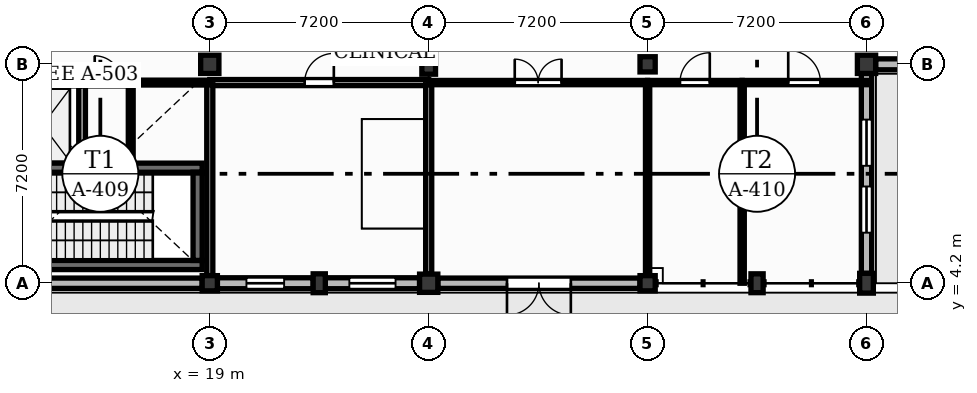
"""IFC4 building model, lengths in metres.
Left out: names, types, materials, properties, quantities, classifications, styles, units other than length and angle.
Written with IfcOpenShell. Run it as: python <this file> out.ifc"""

import sys

from ifc_helpers import new_model, si_unit, direction, frame, frame_2d, origin, origin_2d, place, context, subcontext, project, spatial, rectangle, extrude, element, fill, save


model = new_model("IFC4")
c1 = context("Model", 3, precision=1e-05, world=origin(), true_north=direction((0.0, 1.0)))
c2 = subcontext(c1, "Body", "Model", "MODEL_VIEW")
j1 = project(units=[si_unit("LENGTHUNIT", "METRE"), si_unit("PLANEANGLEUNIT", "RADIAN")], contexts=[c1])
p1 = place(None, origin())
s1 = spatial("IfcSite", under=j1, at=p1, CompositionType="ELEMENT")
p2 = place(p1, origin())
s2 = spatial("IfcBuilding", under=s1, at=p2, CompositionType="ELEMENT")
p3 = place(p2, origin())
s3 = spatial("IfcBuildingStorey", under=s2, at=p3, CompositionType="ELEMENT", Elevation=0.0)
p4 = place(p3, frame((19.0, 4.2, 0.0), z_axis=(0.0, 0.0, 1.0), x_axis=(1.0, 0.0, 0.0)))
e1 = element("IfcColumn", 1, at=p4, inside=s3, PredefinedType="COLUMN", context=c2, shape_type="SweptSolid", body=[
    extrude(rectangle(XDim=0.5, YDim=0.5, at=origin_2d()), origin(), (0.0, 0.0, 1.0), 4.2),
])
for number, where, z_axis, x_axis in (
    (2, (19.0, 11.4, 0.0), (0.0, 0.0, 1.0), (1.0, 0.0, 0.0)),
    (3, (26.2, 4.2, 0.0), (0.0, 0.0, 1.0), (1.0, 0.0, 0.0)),
):
    element("IfcColumn", number, at=place(p3, frame(where, z_axis=z_axis, x_axis=x_axis)), inside=s3, PredefinedType="COLUMN", context=c2, shape_type="SweptSolid", body=[
        extrude(rectangle(XDim=0.6, YDim=0.6, at=origin_2d()), origin(), (0.0, 0.0, 1.0), 4.2),
    ])
p5 = place(p3, frame((26.2, 11.4, 0.0), z_axis=(0.0, 0.0, 1.0), x_axis=(1.0, 0.0, 0.0)))
e4 = element("IfcColumn", 4, at=p5, inside=s3, PredefinedType="COLUMN", context=c2, shape_type="SweptSolid", body=[
    extrude(rectangle(XDim=0.45, YDim=0.65, at=origin_2d()), origin(), (0.0, 0.0, 1.0), 4.2),
])
for number, where, z_axis, x_axis in (
    (5, (33.4, 4.2, 0.0), (0.0, 0.0, 1.0), (1.0, 0.0, 0.0)),
    (6, (33.4, 11.4, 0.0), (0.0, 0.0, 1.0), (1.0, 0.0, 0.0)),
):
    element("IfcColumn", number, at=place(p3, frame(where, z_axis=z_axis, x_axis=x_axis)), inside=s3, PredefinedType="COLUMN", context=c2, shape_type="SweptSolid", body=[
        extrude(rectangle(XDim=0.5, YDim=0.5, at=origin_2d()), origin(), (0.0, 0.0, 1.0), 4.2),
    ])
p6 = place(p3, frame((40.6, 4.2, 0.0), z_axis=(0.0, 0.0, 1.0), x_axis=(1.0, 0.0, 0.0)))
e7 = element("IfcColumn", 7, at=p6, inside=s3, PredefinedType="COLUMN", context=c2, shape_type="SweptSolid", body=[
    extrude(rectangle(XDim=0.45, YDim=0.65, at=origin_2d()), origin(), (0.0, 0.0, 1.0), 4.2),
])
p7 = place(p3, frame((40.6, 11.4, 0.0), z_axis=(0.0, 0.0, 1.0), x_axis=(1.0, 0.0, 0.0)))
e8 = element("IfcColumn", 8, at=p7, inside=s3, PredefinedType="COLUMN", context=c2, shape_type="SweptSolid", body=[
    extrude(rectangle(XDim=0.6, YDim=0.6, at=origin_2d()), origin(), (0.0, 0.0, 1.0), 4.2),
])
for number, where, z_axis, x_axis in (
    (9, (22.6, 4.2, 0.0), (0.0, 0.0, 1.0), (1.0, 0.0, 0.0)),
    (10, (37.0, 4.2, 0.0), (0.0, 0.0, 1.0), (1.0, 0.0, 0.0)),
):
    element("IfcColumn", number, at=place(p3, frame(where, z_axis=z_axis, x_axis=x_axis)), inside=s3, PredefinedType="PILASTER", context=c2, shape_type="SweptSolid", body=[
        extrude(rectangle(XDim=0.4, YDim=0.62, at=origin_2d()), origin(), (0.0, 0.0, 1.0), 4.2),
    ])
p8 = place(p3, frame((12.025, 4.2, 0.0), z_axis=(0.0, 0.0, 1.0), x_axis=(1.0, 0.0, 0.0)))
e11 = element("IfcWall", 11, at=p8, inside=s3, PredefinedType="SOLIDWALL", context=c2, shape_type="SweptSolid", body=[
    extrude(rectangle(XDim=6.725, YDim=0.34, at=frame_2d((3.363, 0.0))), origin(), (0.0, 0.0, 1.0), 3.68),
])
p9 = place(p3, frame((19.25, 4.2, 0.0), z_axis=(0.0, 0.0, 1.0), x_axis=(1.0, 0.0, 0.0)))
e12 = element("IfcWall", 12, at=p9, inside=s3, PredefinedType="SOLIDWALL", context=c2, shape_type="SweptSolid", body=[
    extrude(rectangle(XDim=3.15, YDim=0.36, at=frame_2d((1.575, 0.0))), origin(), (0.0, 0.0, 1.0), 3.68),
])
p10 = place(p9, frame((0.955, 0.0, 1.0)))
e13 = element("IfcOpeningElement", 13, at=p10, cuts=e12, PredefinedType="OPENING", context=c2, shape_type="SweptSolid", body=[
    extrude(rectangle(XDim=1.24, YDim=1.8, at=frame_2d((0.62, 0.9))), frame((0.0, 0.19, 0.0), z_axis=(0.0, -1.0, 0.0), x_axis=(1.0, 0.0, 0.0)), (0.0, 0.0, 1.0), 0.38),
])
p11 = place(p3, frame((22.8, 4.2, 0.0), z_axis=(0.0, 0.0, 1.0), x_axis=(1.0, 0.0, 0.0)))
e14 = element("IfcWall", 14, at=p11, inside=s3, PredefinedType="SOLIDWALL", context=c2, shape_type="SweptSolid", body=[
    extrude(rectangle(XDim=3.1, YDim=0.36, at=frame_2d((1.55, 0.0))), origin(), (0.0, 0.0, 1.0), 3.68),
])
p12 = place(p11, frame((0.79, 0.0, 1.0)))
e15 = element("IfcOpeningElement", 15, at=p12, cuts=e14, PredefinedType="OPENING", context=c2, shape_type="SweptSolid", body=[
    extrude(rectangle(XDim=1.52, YDim=1.8, at=frame_2d((0.76, 0.9))), frame((0.0, 0.19, 0.0), z_axis=(0.0, -1.0, 0.0), x_axis=(1.0, 0.0, 0.0)), (0.0, 0.0, 1.0), 0.38),
])
p13 = place(p3, frame((26.5, 4.2, 0.0), z_axis=(0.0, 0.0, 1.0), x_axis=(1.0, 0.0, 0.0)))
e16 = element("IfcWall", 16, at=p13, inside=s3, PredefinedType="SOLIDWALL", context=c2, shape_type="SweptSolid", body=[
    extrude(rectangle(XDim=6.65, YDim=0.34, at=frame_2d((3.325, 0.0))), origin(), (0.0, 0.0, 1.0), 3.68),
])
p14 = place(p13, frame((2.275, 0.0, 0.0)))
e17 = element("IfcOpeningElement", 17, at=p14, cuts=e16, PredefinedType="OPENING", context=c2, shape_type="SweptSolid", body=[
    extrude(rectangle(XDim=2.1, YDim=2.6, at=frame_2d((1.05, 1.3))), frame((0.0, 0.18, 0.0), z_axis=(0.0, -1.0, 0.0), x_axis=(1.0, 0.0, 0.0)), (0.0, 0.0, 1.0), 0.36),
])
p15 = place(p3, frame((40.6, 4.525, 0.0), z_axis=(0.0, 0.0, 1.0), x_axis=(0.0, 1.0, 0.0)))
e18 = element("IfcWall", 18, at=p15, inside=s3, PredefinedType="SOLIDWALL", context=c2, shape_type="SweptSolid", body=[
    extrude(rectangle(XDim=6.575, YDim=0.34, at=frame_2d((3.288, 0.0))), origin(), (0.0, 0.0, 1.0), 3.68),
])
p16 = place(p15, frame((1.337, 0.0, 1.0)))
e19 = element("IfcOpeningElement", 19, at=p16, cuts=e18, PredefinedType="OPENING", context=c2, shape_type="SweptSolid", body=[
    extrude(rectangle(XDim=1.52, YDim=1.8, at=frame_2d((0.76, 0.9))), frame((0.0, 0.18, 0.0), z_axis=(0.0, -1.0, 0.0), x_axis=(1.0, 0.0, 0.0)), (0.0, 0.0, 1.0), 0.36),
])
p17 = place(p15, frame((3.538, 0.0, 1.0)))
e20 = element("IfcOpeningElement", 20, at=p17, cuts=e18, PredefinedType="OPENING", context=c2, shape_type="SweptSolid", body=[
    extrude(rectangle(XDim=1.52, YDim=1.8, at=frame_2d((0.76, 0.9))), frame((0.0, 0.18, 0.0), z_axis=(0.0, -1.0, 0.0), x_axis=(1.0, 0.0, 0.0)), (0.0, 0.0, 1.0), 0.36),
])
p18 = place(p3, frame((40.9, 11.4, 0.0), z_axis=(0.0, 0.0, 1.0), x_axis=(1.0, 0.0, 0.0)))
e21 = element("IfcWall", 21, at=p18, inside=s3, PredefinedType="SOLIDWALL", context=c2, shape_type="SweptSolid", body=[
    extrude(rectangle(XDim=6.65, YDim=0.36, at=frame_2d((3.325, 0.0))), origin(), (0.0, 0.0, 1.0), 3.68),
])
p19 = place(p18, frame((2.735, 0.0, 0.0)))
e22 = element("IfcOpeningElement", 22, at=p19, cuts=e21, PredefinedType="OPENING", context=c2, shape_type="SweptSolid", body=[
    extrude(rectangle(XDim=1.18, YDim=2.2, at=frame_2d((0.59, 1.1))), frame((0.0, 0.19, 0.0), z_axis=(0.0, -1.0, 0.0), x_axis=(1.0, 0.0, 0.0)), (0.0, 0.0, 1.0), 0.38),
])
p20 = place(p18, frame((0.788, 0.0, 1.0)))
e23 = element("IfcOpeningElement", 23, at=p20, cuts=e21, PredefinedType="OPENING", context=c2, shape_type="SweptSolid", body=[
    extrude(rectangle(XDim=1.22, YDim=2.2, at=frame_2d((0.61, 1.1))), frame((0.0, 0.19, 0.0), z_axis=(0.0, -1.0, 0.0), x_axis=(1.0, 0.0, 0.0)), (0.0, 0.0, 1.0), 0.38),
])
p21 = place(p18, frame((4.577, 0.0, 1.0)))
e24 = element("IfcOpeningElement", 24, at=p21, cuts=e21, PredefinedType="OPENING", context=c2, shape_type="SweptSolid", body=[
    extrude(rectangle(XDim=1.35, YDim=2.2, at=frame_2d((0.675, 1.1))), frame((0.0, 0.19, 0.0), z_axis=(0.0, -1.0, 0.0), x_axis=(1.0, 0.0, 0.0)), (0.0, 0.0, 1.0), 0.38),
])
for number, where, z_axis, x_axis in (
    (25, (12.05, 4.8, 0.0), (0.0, 0.0, 1.0), (1.0, 0.0, 0.0)),
    (26, (12.05, 8.0, 0.0), (0.0, 0.0, 1.0), (1.0, 0.0, 0.0)),
):
    element("IfcWall", number, at=place(p3, frame(where, z_axis=z_axis, x_axis=x_axis)), inside=s3, PredefinedType="SHEAR", context=c2, shape_type="SweptSolid", body=[
        extrude(rectangle(XDim=6.7, YDim=0.3, at=frame_2d((3.35, 0.0))), origin(), (0.0, 0.0, 1.0), 4.25),
    ])
p22 = place(p3, frame((18.6, 4.95, 0.0), z_axis=(0.0, 0.0, 1.0), x_axis=(0.0, 1.0, 0.0)))
e27 = element("IfcWall", 27, at=p22, inside=s3, PredefinedType="SHEAR", context=c2, shape_type="SweptSolid", body=[
    extrude(rectangle(XDim=2.9, YDim=0.3, at=frame_2d((1.45, 0.0))), origin(), (0.0, 0.0, 1.0), 4.25),
])
p23 = place(p3, frame((12.2, 10.8, 0.0), z_axis=(0.0, 0.0, 1.0), x_axis=(1.0, 0.0, 0.0)))
e28 = element("IfcWall", 28, at=p23, inside=s3, PredefinedType="SOLIDWALL", context=c2, shape_type="SweptSolid", body=[
    extrude(rectangle(XDim=2.6, YDim=0.22, at=frame_2d((1.3, 0.0))), origin(), (0.0, 0.0, 1.0), 4.25),
])
p24 = place(p3, frame((14.8, 8.11, 0.0), z_axis=(0.0, 0.0, 1.0), x_axis=(0.0, 1.0, 0.0)))
e29 = element("IfcWall", 29, at=p24, inside=s3, PredefinedType="SOLIDWALL", context=c2, shape_type="SweptSolid", body=[
    extrude(rectangle(XDim=2.58, YDim=0.22, at=frame_2d((1.29, 0.0))), origin(), (0.0, 0.0, 1.0), 4.25),
])
p25 = place(p3, frame((14.91, 10.8, 0.0), z_axis=(0.0, 0.0, 1.0), x_axis=(1.0, 0.0, 0.0)))
e30 = element("IfcWall", 30, at=p25, inside=s3, PredefinedType="SOLIDWALL", context=c2, shape_type="SweptSolid", body=[
    extrude(rectangle(XDim=1.49, YDim=0.22, at=frame_2d((0.745, 0.0))), origin(), (0.0, 0.0, 1.0), 4.18),
])
p26 = place(p25, frame((0.305, 0.0, 0.0)))
e31 = element("IfcOpeningElement", 31, at=p26, cuts=e30, PredefinedType="OPENING", context=c2, shape_type="SweptSolid", body=[
    extrude(rectangle(XDim=0.88, YDim=2.05, at=frame_2d((0.44, 1.025))), frame((0.0, 0.12, 0.0), z_axis=(0.0, -1.0, 0.0), x_axis=(1.0, 0.0, 0.0)), (0.0, 0.0, 1.0), 0.24),
])
p27 = place(p3, frame((19.0, 10.8, 0.0), z_axis=(0.0, 0.0, 1.0), x_axis=(1.0, 0.0, 0.0)))
e32 = element("IfcWall", 32, at=p27, inside=s3, PredefinedType="PARTITIONING", context=c2, shape_type="SweptSolid", body=[
    extrude(rectangle(XDim=7.2, YDim=0.2, at=frame_2d((3.6, 0.0))), origin(), (0.0, 0.0, 1.0), 4.18),
])
p28 = place(p27, frame((3.12, 0.0, 0.0)))
e33 = element("IfcOpeningElement", 33, at=p28, cuts=e32, PredefinedType="OPENING", context=c2, shape_type="SweptSolid", body=[
    extrude(rectangle(XDim=0.96, YDim=2.1, at=frame_2d((0.48, 1.05))), frame((0.0, 0.11, 0.0), z_axis=(0.0, -1.0, 0.0), x_axis=(1.0, 0.0, 0.0)), (0.0, 0.0, 1.0), 0.22),
])
p29 = place(p3, frame((26.2, 4.5, 0.0), z_axis=(0.0, 0.0, 1.0), x_axis=(0.0, 1.0, 0.0)))
e34 = element("IfcWall", 34, at=p29, inside=s3, PredefinedType="PARTITIONING", context=c2, shape_type="SweptSolid", body=[
    extrude(rectangle(XDim=6.23, YDim=0.2, at=frame_2d((3.115, 0.0))), origin(), (0.0, 0.0, 1.0), 3.5),
])
p30 = place(p3, frame((26.2, 10.8, 0.0), z_axis=(0.0, 0.0, 1.0), x_axis=(1.0, 0.0, 0.0)))
e35 = element("IfcWall", 35, at=p30, inside=s3, PredefinedType="PARTITIONING", context=c2, shape_type="SweptSolid", body=[
    extrude(rectangle(XDim=7.2, YDim=0.14, at=frame_2d((3.6, 0.0))), origin(), (0.0, 0.0, 1.0), 4.18),
])
p31 = place(p30, frame((2.83, 0.0, 0.0)))
e36 = element("IfcOpeningElement", 36, at=p31, cuts=e35, PredefinedType="OPENING", context=c2, shape_type="SweptSolid", body=[
    extrude(rectangle(XDim=1.54, YDim=2.25, at=frame_2d((0.77, 1.125))), frame((0.0, 0.08, 0.0), z_axis=(0.0, -1.0, 0.0), x_axis=(1.0, 0.0, 0.0)), (0.0, 0.0, 1.0), 0.16),
])
p32 = place(p3, frame((33.4, 4.45, 0.0), z_axis=(0.0, 0.0, 1.0), x_axis=(0.0, 1.0, 0.0)))
e37 = element("IfcWall", 37, at=p32, inside=s3, PredefinedType="PARTITIONING", context=c2, shape_type="SweptSolid", body=[
    extrude(rectangle(XDim=6.28, YDim=0.14, at=frame_2d((3.14, 0.0))), origin(), (0.0, 0.0, 1.0), 3.5),
])
p33 = place(p3, frame((33.4, 10.8, 0.0), z_axis=(0.0, 0.0, 1.0), x_axis=(1.0, 0.0, 0.0)))
e38 = element("IfcWall", 38, at=p33, inside=s3, PredefinedType="PARTITIONING", context=c2, shape_type="SweptSolid", body=[
    extrude(rectangle(XDim=3.11, YDim=0.14, at=frame_2d((1.555, 0.0))), origin(), (0.0, 0.0, 1.0), 4.18),
])
p34 = place(p33, frame((1.065, 0.0, 0.0)))
e39 = element("IfcOpeningElement", 39, at=p34, cuts=e38, PredefinedType="OPENING", context=c2, shape_type="SweptSolid", body=[
    extrude(rectangle(XDim=0.98, YDim=2.15, at=frame_2d((0.49, 1.075))), frame((0.0, 0.08, 0.0), z_axis=(0.0, -1.0, 0.0), x_axis=(1.0, 0.0, 0.0)), (0.0, 0.0, 1.0), 0.16),
])
p35 = place(p3, frame((36.51, 4.2, 0.0), z_axis=(0.0, 0.0, 1.0), x_axis=(0.0, 1.0, 0.0)))
e40 = element("IfcWall", 40, at=p35, inside=s3, PredefinedType="PARTITIONING", context=c2, shape_type="SweptSolid", body=[
    extrude(rectangle(XDim=6.53, YDim=0.14, at=frame_2d((3.265, 0.0))), origin(), (0.0, 0.0, 1.0), 4.18),
])
p36 = place(p3, frame((36.51, 10.8, 0.0), z_axis=(0.0, 0.0, 1.0), x_axis=(1.0, 0.0, 0.0)))
e41 = element("IfcWall", 41, at=p36, inside=s3, PredefinedType="PARTITIONING", context=c2, shape_type="SweptSolid", body=[
    extrude(rectangle(XDim=4.09, YDim=0.14, at=frame_2d((2.045, 0.0))), origin(), (0.0, 0.0, 1.0), 4.18),
])
p37 = place(p36, frame((1.515, 0.0, 0.0)))
e42 = element("IfcOpeningElement", 42, at=p37, cuts=e41, PredefinedType="OPENING", context=c2, shape_type="SweptSolid", body=[
    extrude(rectangle(XDim=1.06, YDim=2.15, at=frame_2d((0.53, 1.075))), frame((0.0, 0.08, 0.0), z_axis=(0.0, -1.0, 0.0), x_axis=(1.0, 0.0, 0.0)), (0.0, 0.0, 1.0), 0.16),
])
p38 = place(p3, frame((16.4, 8.14, 0.0), z_axis=(0.0, 0.0, 1.0), x_axis=(0.0, 1.0, 0.0)))
e43 = element("IfcWall", 43, at=p38, inside=s3, PredefinedType="PARTITIONING", context=c2, shape_type="SweptSolid", body=[
    extrude(rectangle(XDim=2.59, YDim=0.16, at=frame_2d((1.295, 0.0))), origin(), (0.0, 0.0, 1.0), 4.18),
])
p39 = place(p3, frame((16.4, 10.8, 0.0), z_axis=(0.0, 0.0, 1.0), x_axis=(1.0, 0.0, 0.0)))
e44 = element("IfcWall", 44, at=p39, inside=s3, PredefinedType="PARTITIONING", context=c2, shape_type="SweptSolid", body=[
    extrude(rectangle(XDim=2.6, YDim=0.16, at=frame_2d((1.3, 0.0))), origin(), (0.0, 0.0, 1.0), 4.18),
])
p40 = place(p3, frame((19.0, 4.45, 0.0), z_axis=(0.0, 0.0, 1.0), x_axis=(0.0, 1.0, 0.0)))
e45 = element("IfcWall", 45, at=p40, inside=s3, PredefinedType="PARTITIONING", context=c2, shape_type="SweptSolid", body=[
    extrude(rectangle(XDim=6.28, YDim=0.2, at=frame_2d((3.14, 0.0))), origin(), (0.0, 0.0, 1.0), 3.5),
])
p41 = place(p10, origin())
e46 = element("IfcWindow", 46, at=p41, inside=s3, PartitioningType="SINGLE_PANEL", PredefinedType="WINDOW", context=c2, shape_type="SweptSolid", body=[
    extrude(rectangle(XDim=1.24, YDim=1.8, at=frame_2d((0.62, 0.9))), frame((0.0, 0.03, 0.0), z_axis=(0.0, -1.0, 0.0), x_axis=(1.0, 0.0, 0.0)), (0.0, 0.0, 1.0), 0.06),
])
fill(e13, e46)
p42 = place(p12, origin())
e47 = element("IfcWindow", 47, at=p42, inside=s3, PartitioningType="DOUBLE_PANEL_VERTICAL", PredefinedType="WINDOW", context=c2, shape_type="SweptSolid", body=[
    extrude(rectangle(XDim=1.52, YDim=1.8, at=frame_2d((0.76, 0.9))), frame((0.0, 0.03, 0.0), z_axis=(0.0, -1.0, 0.0), x_axis=(1.0, 0.0, 0.0)), (0.0, 0.0, 1.0), 0.06),
])
fill(e15, e47)
p43 = place(p14, frame((2.1, 0.0, 0.0), z_axis=(0.0, 0.0, 1.0), x_axis=(-1.0, 0.0, 0.0)))
e48 = element("IfcDoor", 48, at=p43, inside=s3, OperationType="DOUBLE_DOOR_SINGLE_SWING", PredefinedType="DOOR", context=c2, shape_type="SweptSolid", body=[
    extrude(rectangle(XDim=2.1, YDim=2.6, at=frame_2d((1.05, 1.3))), frame((0.0, 0.025, 0.0), z_axis=(0.0, -1.0, 0.0), x_axis=(1.0, 0.0, 0.0)), (0.0, 0.0, 1.0), 0.05),
])
fill(e17, e48)
p44 = place(p16, origin())
e49 = element("IfcWindow", 49, at=p44, inside=s3, PartitioningType="DOUBLE_PANEL_VERTICAL", PredefinedType="WINDOW", context=c2, shape_type="SweptSolid", body=[
    extrude(rectangle(XDim=1.52, YDim=1.8, at=frame_2d((0.76, 0.9))), frame((0.0, 0.03, 0.0), z_axis=(0.0, -1.0, 0.0), x_axis=(1.0, 0.0, 0.0)), (0.0, 0.0, 1.0), 0.06),
])
fill(e19, e49)
p45 = place(p17, origin())
e50 = element("IfcWindow", 50, at=p45, inside=s3, PartitioningType="DOUBLE_PANEL_VERTICAL", PredefinedType="WINDOW", context=c2, shape_type="SweptSolid", body=[
    extrude(rectangle(XDim=1.52, YDim=1.8, at=frame_2d((0.76, 0.9))), frame((0.0, 0.03, 0.0), z_axis=(0.0, -1.0, 0.0), x_axis=(1.0, 0.0, 0.0)), (0.0, 0.0, 1.0), 0.06),
])
fill(e20, e50)
p46 = place(p26, origin())
e51 = element("IfcDoor", 51, at=p46, inside=s3, OperationType="SINGLE_SWING_LEFT", PredefinedType="DOOR", context=c2, shape_type="SweptSolid", body=[
    extrude(rectangle(XDim=0.88, YDim=2.05, at=frame_2d((0.44, 1.025))), frame((0.0, 0.025, 0.0), z_axis=(0.0, -1.0, 0.0), x_axis=(1.0, 0.0, 0.0)), (0.0, 0.0, 1.0), 0.05),
])
fill(e31, e51)
p47 = place(p28, origin())
e52 = element("IfcDoor", 52, at=p47, inside=s3, OperationType="SINGLE_SWING_RIGHT", PredefinedType="DOOR", context=c2, shape_type="SweptSolid", body=[
    extrude(rectangle(XDim=0.96, YDim=2.1, at=frame_2d((0.48, 1.05))), frame((0.0, 0.025, 0.0), z_axis=(0.0, -1.0, 0.0), x_axis=(1.0, 0.0, 0.0)), (0.0, 0.0, 1.0), 0.05),
])
fill(e33, e52)
p48 = place(p31, origin())
e53 = element("IfcDoor", 53, at=p48, inside=s3, OperationType="DOUBLE_DOOR_SINGLE_SWING", PredefinedType="DOOR", context=c2, shape_type="SweptSolid", body=[
    extrude(rectangle(XDim=1.54, YDim=2.25, at=frame_2d((0.77, 1.125))), frame((0.0, 0.025, 0.0), z_axis=(0.0, -1.0, 0.0), x_axis=(1.0, 0.0, 0.0)), (0.0, 0.0, 1.0), 0.05),
])
fill(e36, e53)
p49 = place(p34, origin())
e54 = element("IfcDoor", 54, at=p49, inside=s3, OperationType="SINGLE_SWING_RIGHT", PredefinedType="DOOR", context=c2, shape_type="SweptSolid", body=[
    extrude(rectangle(XDim=0.98, YDim=2.15, at=frame_2d((0.49, 1.075))), frame((0.0, 0.025, 0.0), z_axis=(0.0, -1.0, 0.0), x_axis=(1.0, 0.0, 0.0)), (0.0, 0.0, 1.0), 0.05),
])
fill(e39, e54)
p50 = place(p37, origin())
e55 = element("IfcDoor", 55, at=p50, inside=s3, OperationType="SINGLE_SWING_LEFT", PredefinedType="DOOR", context=c2, shape_type="SweptSolid", body=[
    extrude(rectangle(XDim=1.06, YDim=2.15, at=frame_2d((0.53, 1.075))), frame((0.0, 0.025, 0.0), z_axis=(0.0, -1.0, 0.0), x_axis=(1.0, 0.0, 0.0)), (0.0, 0.0, 1.0), 0.05),
])
fill(e42, e55)
save(model, sys.argv[1])
